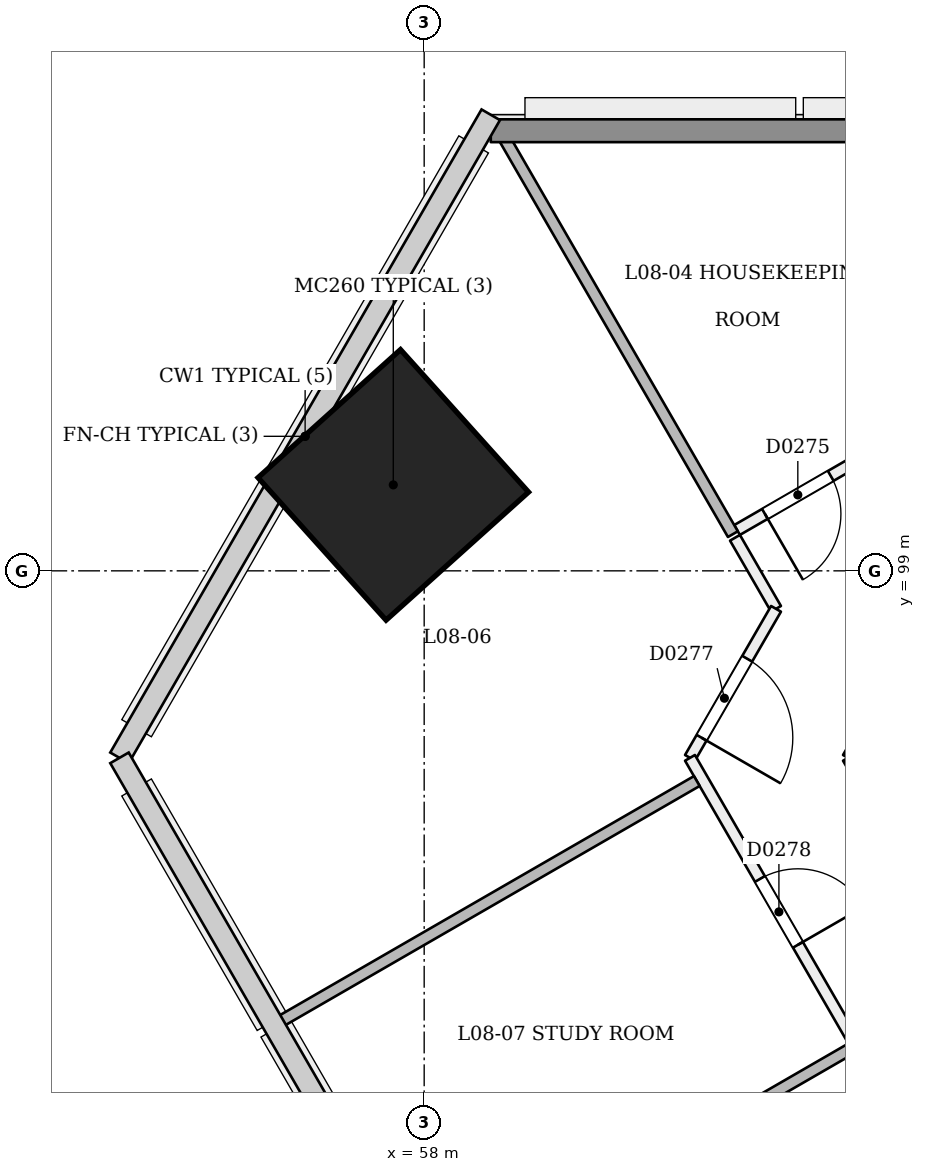
"""IFC4 building model, lengths in metres.
Left out: names, types, materials, properties, quantities, classifications, styles, units other than length and angle.
Written with IfcOpenShell. Run it as: python <this file> out.ifc"""

import sys

from ifc_helpers import new_model, si_unit, direction, frame, frame_2d, origin, origin_2d, place, context, subcontext, project, spatial, rectangle, extrude, element, fill, save


model = new_model("IFC4")
c1 = context("Model", 3, precision=1e-05, world=origin(), true_north=direction((0.0, 1.0)))
c2 = subcontext(c1, "Body", "Model", "MODEL_VIEW")
j1 = project(units=[si_unit("LENGTHUNIT", "METRE"), si_unit("PLANEANGLEUNIT", "RADIAN")], contexts=[c1])
p1 = place(None, origin())
s1 = spatial("IfcSite", under=j1, at=p1, CompositionType="ELEMENT")
p2 = place(p1, origin())
s2 = spatial("IfcBuilding", under=s1, at=p2, CompositionType="ELEMENT")
p3 = place(p2, frame((0.0, 0.0, 37.8)))
s3 = spatial("IfcBuildingStorey", under=s2, at=p3, CompositionType="ELEMENT", Elevation=37.8)
p4 = place(p3, frame((57.56, 100.12, 0.0), z_axis=(0.028403739082, 0.009219352065, 0.999554016126), x_axis=(-0.865120076152, 0.501167445074, 0.01996110813)))
e1 = element("IfcColumn", 1, at=p4, inside=s3, PredefinedType="COLUMN", context=c2, shape_type="SweptSolid", body=[
    extrude(rectangle(XDim=2.52, YDim=2.52, at=origin_2d()), origin(), (0.0, 0.0, 1.0), 3.602),
])
p5 = place(p3, frame((65.966, 92.4, 0.0), z_axis=(0.0, 0.0, 1.0), x_axis=(-0.499995077365, 0.86602824585, 0.0)))
e2 = element("IfcWall", 2, at=p5, inside=s3, PredefinedType="PARTITIONING", context=c2, shape_type="SweptSolid", body=[
    extrude(rectangle(XDim=4.78, YDim=0.15, at=frame_2d((2.39, 0.0))), origin(), (0.0, 0.0, 1.0), 3.1),
])
p6 = place(p5, frame((2.284, 0.0, 0.0)))
e3 = element("IfcOpeningElement", 3, at=p6, cuts=e2, PredefinedType="OPENING", context=c2, shape_type="SweptSolid", body=[
    extrude(rectangle(XDim=0.9, YDim=2.1, at=frame_2d((0.45, 1.05))), frame((0.0, 0.085, 0.0), z_axis=(0.0, -1.0, 0.0), x_axis=(1.0, 0.0, 0.0)), (0.0, 0.0, 1.0), 0.171),
])
p7 = place(p3, frame((63.575, 96.54, 0.0), z_axis=(0.0, 0.0, 1.0), x_axis=(0.499960060149, 0.86604846184, 0.0)))
e4 = element("IfcWall", 4, at=p7, inside=s3, PredefinedType="PARTITIONING", context=c2, shape_type="SweptSolid", body=[
    extrude(rectangle(XDim=1.038, YDim=0.15, at=frame_2d((0.519, 0.0))), origin(), (0.0, 0.0, 1.0), 3.1),
])
p8 = place(p3, frame((63.61, 100.4, 0.0), z_axis=(0.0, 0.0, 1.0), x_axis=(-0.866074815912, -0.499914405916, 0.0)))
e5 = element("IfcWall", 5, at=p8, inside=s3, PredefinedType="PARTITIONING", context=c2, shape_type="SweptSolid", body=[
    extrude(rectangle(XDim=1.725, YDim=0.15, at=frame_2d((0.862, 0.0))), origin(), (0.0, 0.0, 1.0), 3.1),
])
p9 = place(p8, frame((0.302, 0.0, 0.0)))
e6 = element("IfcOpeningElement", 6, at=p9, cuts=e5, PredefinedType="OPENING", context=c2, shape_type="SweptSolid", body=[
    extrude(rectangle(XDim=1.0, YDim=2.1, at=frame_2d((0.5, 1.05))), frame((0.0, 0.085, 0.0), z_axis=(0.0, -1.0, 0.0), x_axis=(1.0, 0.0, 0.0)), (0.0, 0.0, 1.0), 0.171),
])
p10 = place(p3, frame((62.089, 99.435, 0.0), z_axis=(0.0, 0.0, 1.0), x_axis=(0.499957341738, -0.866050031143, 0.0)))
e7 = element("IfcWall", 7, at=p10, inside=s3, PredefinedType="PARTITIONING", context=c2, shape_type="SweptSolid", body=[
    extrude(rectangle(XDim=1.08, YDim=0.15, at=frame_2d((0.54, 0.0))), origin(), (0.0, 0.0, 1.0), 3.1),
])
p11 = place(p3, frame((62.629, 98.5, 0.0), z_axis=(0.0, 0.0, 1.0), x_axis=(-0.499955884205, -0.866050872552, 0.0)))
e8 = element("IfcWall", 8, at=p11, inside=s3, PredefinedType="PARTITIONING", context=c2, shape_type="SweptSolid", body=[
    extrude(rectangle(XDim=2.263, YDim=0.15, at=frame_2d((1.132, 0.0))), origin(), (0.0, 0.0, 1.0), 3.1),
])
p12 = place(p11, frame((0.758, 0.0, 0.0)))
e9 = element("IfcOpeningElement", 9, at=p12, cuts=e8, PredefinedType="OPENING", context=c2, shape_type="SweptSolid", body=[
    extrude(rectangle(XDim=1.2, YDim=2.1, at=frame_2d((0.6, 1.05))), frame((0.0, 0.085, 0.0), z_axis=(0.0, -1.0, 0.0), x_axis=(1.0, 0.0, 0.0)), (0.0, 0.0, 1.0), 0.171),
])
p13 = place(p3, frame((61.497, 96.54, 0.0), z_axis=(0.0, 0.0, 1.0), x_axis=(0.499995935097, -0.866027750645, 0.0)))
e10 = element("IfcWall", 10, at=p13, inside=s3, PredefinedType="PARTITIONING", context=c2, shape_type="SweptSolid", body=[
    extrude(rectangle(XDim=44.742, YDim=0.15, at=frame_2d((22.371, 0.0))), origin(), (0.0, 0.0, 1.0), 2.7),
])
p14 = place(p13, frame((1.84, 0.0, 0.0)))
e11 = element("IfcOpeningElement", 11, at=p14, cuts=e10, PredefinedType="OPENING", context=c2, shape_type="SweptSolid", body=[
    extrude(rectangle(XDim=1.0, YDim=2.1, at=frame_2d((0.5, 1.05))), frame((0.0, 0.085, 0.0), z_axis=(0.0, -1.0, 0.0), x_axis=(1.0, 0.0, 0.0)), (0.0, 0.0, 1.0), 0.171),
])
p15 = place(p13, frame((4.942, 0.0, 0.0)))
e12 = element("IfcOpeningElement", 12, at=p15, cuts=e10, PredefinedType="OPENING", context=c2, shape_type="SweptSolid", body=[
    extrude(rectangle(XDim=1.1, YDim=2.1, at=frame_2d((0.55, 1.05))), frame((0.0, 0.085, 0.0), z_axis=(0.0, -1.0, 0.0), x_axis=(1.0, 0.0, 0.0)), (0.0, 0.0, 1.0), 0.171),
])
p16 = place(p13, frame((11.651, 0.0, 0.0)))
e13 = element("IfcOpeningElement", 13, at=p16, cuts=e10, PredefinedType="OPENING", context=c2, shape_type="SweptSolid", body=[
    extrude(rectangle(XDim=1.0, YDim=2.1, at=frame_2d((0.5, 1.05))), frame((0.0, 0.085, 0.0), z_axis=(0.0, -1.0, 0.0), x_axis=(1.0, 0.0, 0.0)), (0.0, 0.0, 1.0), 0.171),
])
p17 = place(p13, frame((18.371, 0.0, 0.0)))
e14 = element("IfcOpeningElement", 14, at=p17, cuts=e10, PredefinedType="OPENING", context=c2, shape_type="SweptSolid", body=[
    extrude(rectangle(XDim=1.2, YDim=2.1, at=frame_2d((0.6, 1.05))), frame((0.0, 0.085, 0.0), z_axis=(0.0, -1.0, 0.0), x_axis=(1.0, 0.0, 0.0)), (0.0, 0.0, 1.0), 0.171),
])
p18 = place(p13, frame((23.092, 0.0, 0.0)))
e15 = element("IfcOpeningElement", 15, at=p18, cuts=e10, PredefinedType="OPENING", context=c2, shape_type="SweptSolid", body=[
    extrude(rectangle(XDim=1.0, YDim=2.1, at=frame_2d((0.5, 1.05))), frame((0.0, 0.085, 0.0), z_axis=(0.0, -1.0, 0.0), x_axis=(1.0, 0.0, 0.0)), (0.0, 0.0, 1.0), 0.171),
])
p19 = place(p13, frame((29.767, 0.0, 0.0)))
e16 = element("IfcOpeningElement", 16, at=p19, cuts=e10, PredefinedType="OPENING", context=c2, shape_type="SweptSolid", body=[
    extrude(rectangle(XDim=1.0, YDim=2.1, at=frame_2d((0.5, 1.05))), frame((0.0, 0.085, 0.0), z_axis=(0.0, -1.0, 0.0), x_axis=(1.0, 0.0, 0.0)), (0.0, 0.0, 1.0), 0.171),
])
p20 = place(p13, frame((31.976, 0.0, 0.0)))
e17 = element("IfcOpeningElement", 17, at=p20, cuts=e10, PredefinedType="OPENING", context=c2, shape_type="SweptSolid", body=[
    extrude(rectangle(XDim=1.0, YDim=2.1, at=frame_2d((0.5, 1.05))), frame((0.0, 0.085, 0.0), z_axis=(0.0, -1.0, 0.0), x_axis=(1.0, 0.0, 0.0)), (0.0, 0.0, 1.0), 0.171),
])
p21 = place(p13, frame((38.767, 0.0, 0.0)))
e18 = element("IfcOpeningElement", 18, at=p21, cuts=e10, PredefinedType="OPENING", context=c2, shape_type="SweptSolid", body=[
    extrude(rectangle(XDim=1.0, YDim=2.1, at=frame_2d((0.5, 1.05))), frame((0.0, 0.085, 0.0), z_axis=(0.0, -1.0, 0.0), x_axis=(1.0, 0.0, 0.0)), (0.0, 0.0, 1.0), 0.171),
])
p22 = place(p13, frame((40.707, 0.0, 0.0)))
e19 = element("IfcOpeningElement", 19, at=p22, cuts=e10, PredefinedType="OPENING", context=c2, shape_type="SweptSolid", body=[
    extrude(rectangle(XDim=1.0, YDim=2.1, at=frame_2d((0.5, 1.05))), frame((0.0, 0.085, 0.0), z_axis=(0.0, -1.0, 0.0), x_axis=(1.0, 0.0, 0.0)), (0.0, 0.0, 1.0), 0.171),
])
p23 = place(p3, frame((58.934, 104.9, 0.0), z_axis=(0.0, 0.0, 1.0), x_axis=(0.500005118993, -0.866022448312, 0.0)))
e20 = element("IfcWall", 20, at=p23, inside=s3, PredefinedType="PARTITIONING", context=c2, shape_type="SweptSolid", body=[
    extrude(rectangle(XDim=6.255, YDim=0.15, at=frame_2d((3.128, 0.0))), origin(), (0.0, 0.0, 1.0), 2.6),
])
for number, where, z_axis, x_axis in (
    (21, (56.092, 93.062, 0.0), (0.0, 0.0, 1.0), (0.866, 0.5, 0.0)),
    (22, (58.123, 89.544, 0.0), (0.0, 0.0, 1.0), (0.866, 0.5, 0.0)),
):
    element("IfcWall", number, at=place(p3, frame(where, z_axis=z_axis, x_axis=x_axis)), inside=s3, PredefinedType="PARTITIONING", context=c2, shape_type="SweptSolid", body=[
        extrude(rectangle(XDim=6.345, YDim=0.15, at=frame_2d((3.173, 0.0))), origin(), (0.0, 0.0, 1.0), 2.6),
    ])
p24 = place(p3, frame((58.876, 104.79, 0.0), z_axis=(0.0, 0.0, 1.0), x_axis=(1.0, 0.0, 0.0)))
e23 = element("IfcWall", 23, at=p24, inside=s3, PredefinedType="SOLIDWALL", context=c2, shape_type="SweptSolid", body=[
    extrude(rectangle(XDim=52.248, YDim=0.3, at=frame_2d((26.124, 0.0))), origin(), (0.0, 0.0, 1.0), 2.6),
])
p25 = place(p9, origin())
e24 = element("IfcDoor", 24, at=p25, inside=s3, OperationType="SINGLE_SWING_RIGHT", PredefinedType="NOTDEFINED", context=c2, shape_type="SweptSolid", body=[
    extrude(rectangle(XDim=1.0, YDim=2.1, at=frame_2d((0.5, 1.05))), frame((0.0, 0.025, 0.0), z_axis=(0.0, -1.0, 0.0), x_axis=(1.0, 0.0, 0.0)), (0.0, 0.0, 1.0), 0.05),
])
fill(e6, e24)
p26 = place(p12, origin())
e25 = element("IfcDoor", 25, at=p26, inside=s3, OperationType="SINGLE_SWING_RIGHT", PredefinedType="NOTDEFINED", context=c2, shape_type="SweptSolid", body=[
    extrude(rectangle(XDim=1.2, YDim=2.1, at=frame_2d((0.6, 1.05))), frame((0.0, 0.025, 0.0), z_axis=(0.0, -1.0, 0.0), x_axis=(1.0, 0.0, 0.0)), (0.0, 0.0, 1.0), 0.05),
])
fill(e9, e25)
p27 = place(p14, origin())
e26 = element("IfcDoor", 26, at=p27, inside=s3, OperationType="SINGLE_SWING_RIGHT", PredefinedType="NOTDEFINED", context=c2, shape_type="SweptSolid", body=[
    extrude(rectangle(XDim=1.0, YDim=2.1, at=frame_2d((0.5, 1.05))), frame((0.0, 0.025, 0.0), z_axis=(0.0, -1.0, 0.0), x_axis=(1.0, 0.0, 0.0)), (0.0, 0.0, 1.0), 0.05),
])
fill(e11, e26)
save(model, sys.argv[1])
